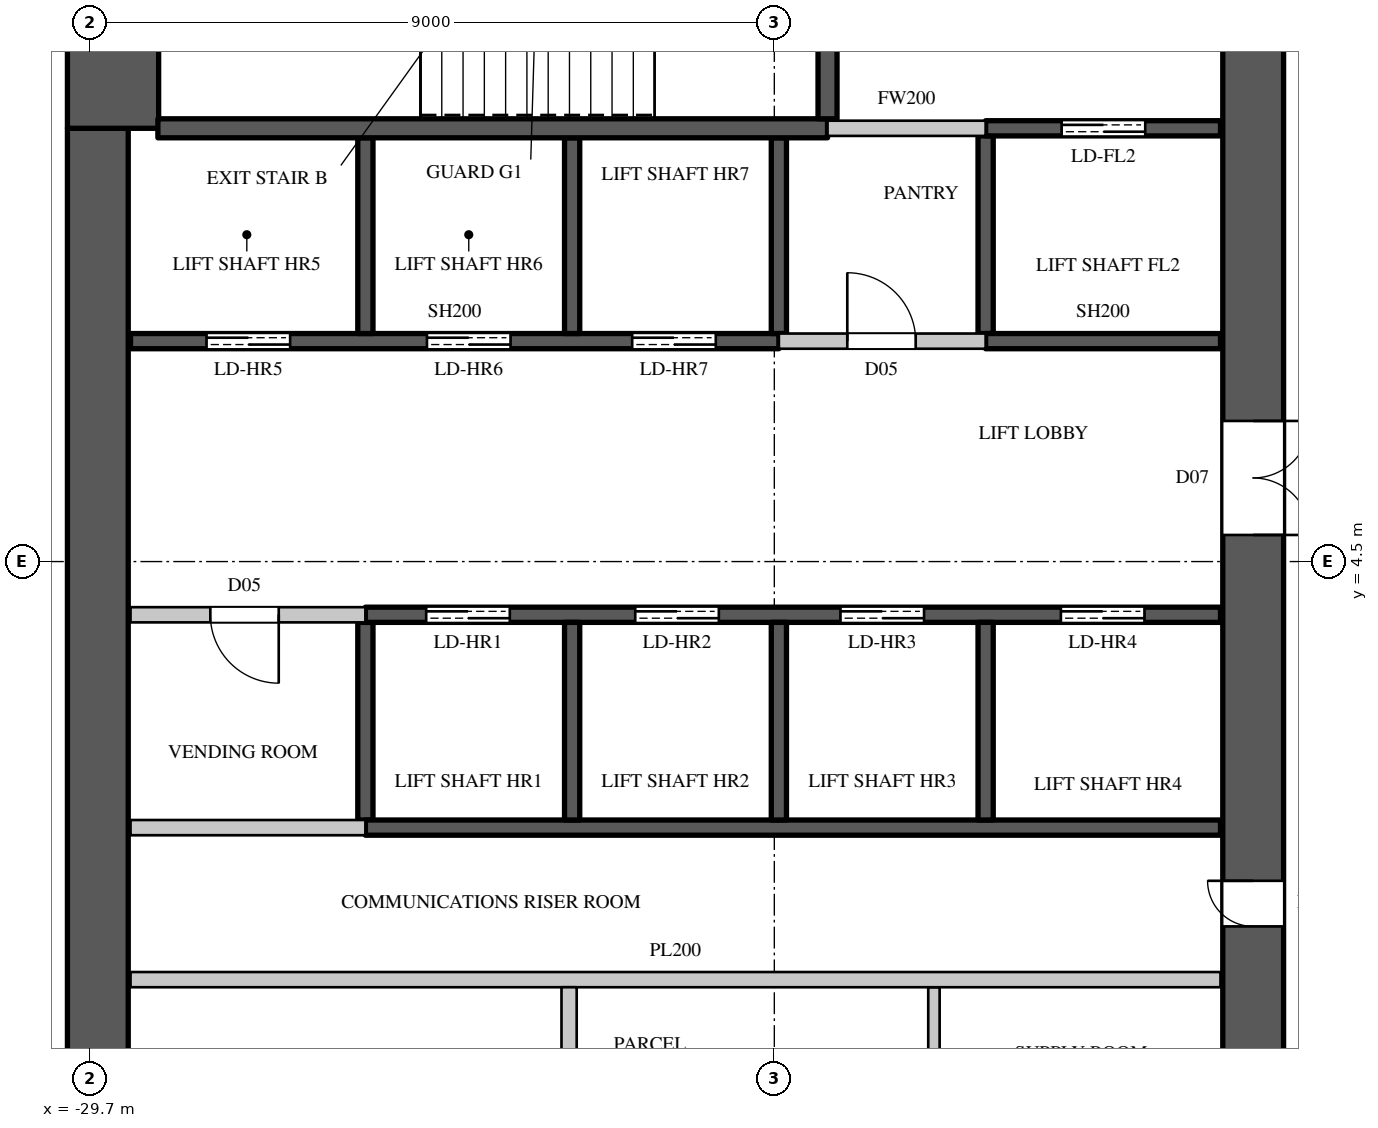
"""IFC4 building model, lengths in metres.
Left out: names, types, materials, properties, quantities, classifications, styles, units other than length and angle.
Written with IfcOpenShell. Run it as: python <this file> out.ifc"""

import sys

from ifc_helpers import new_model, si_unit, direction, frame, frame_2d, origin, place, context, subcontext, project, spatial, rectangle, extrude, element, fill, save


model = new_model("IFC4")
c1 = context("Model", 3, precision=1e-05, world=origin(), true_north=direction((0.0, 1.0)))
c2 = subcontext(c1, "Body", "Model", "MODEL_VIEW")
j1 = project(units=[si_unit("LENGTHUNIT", "METRE"), si_unit("PLANEANGLEUNIT", "RADIAN")], contexts=[c1])
p1 = place(None, origin())
s1 = spatial("IfcSite", under=j1, at=p1, CompositionType="ELEMENT")
p2 = place(p1, origin())
s2 = spatial("IfcBuilding", under=s1, at=p2, CompositionType="ELEMENT")
p3 = place(p2, frame((0.0, 0.0, 205.6)))
s3 = spatial("IfcBuildingStorey", under=s2, at=p3, CompositionType="ELEMENT", Elevation=205.6)
p4 = place(p3, frame((-14.4, -14.8, 0.0), z_axis=(0.0, 0.0, 1.0), x_axis=(0.0, 1.0, 0.0)))
e1 = element("IfcWall", 1, at=p4, inside=s3, PredefinedType="SHEAR", context=c2, shape_type="SweptSolid", body=[
    extrude(rectangle(XDim=29.6, YDim=0.8, at=frame_2d((14.8, 0.0))), origin(), (0.0, 0.0, 1.0), 4.1),
])
p5 = place(p4, frame((1.55, 0.0, 0.0)))
e2 = element("IfcOpeningElement", 2, at=p5, cuts=e1, PredefinedType="OPENING", context=c2, shape_type="SweptSolid", body=[
    extrude(rectangle(XDim=1.5, YDim=2.4, at=frame_2d((0.75, 1.2))), frame((0.0, 0.41, 0.0), z_axis=(0.0, -1.0, 0.0), x_axis=(1.0, 0.0, 0.0)), (0.0, 0.0, 1.0), 0.82),
])
p6 = place(p4, frame((26.55, 0.0, 0.0)))
e3 = element("IfcOpeningElement", 3, at=p6, cuts=e1, PredefinedType="OPENING", context=c2, shape_type="SweptSolid", body=[
    extrude(rectangle(XDim=1.5, YDim=2.4, at=frame_2d((0.75, 1.2))), frame((0.0, 0.41, 0.0), z_axis=(0.0, -1.0, 0.0), x_axis=(1.0, 0.0, 0.0)), (0.0, 0.0, 1.0), 0.82),
])
p7 = place(p4, frame((8.45, 0.0, 0.0)))
e4 = element("IfcOpeningElement", 4, at=p7, cuts=e1, PredefinedType="OPENING", context=c2, shape_type="SweptSolid", body=[
    extrude(rectangle(XDim=1.5, YDim=2.4, at=frame_2d((0.75, 1.2))), frame((0.0, 0.41, 0.0), z_axis=(0.0, -1.0, 0.0), x_axis=(1.0, 0.0, 0.0)), (0.0, 0.0, 1.0), 0.82),
])
p8 = place(p4, frame((19.65, 0.0, 0.0)))
e5 = element("IfcOpeningElement", 5, at=p8, cuts=e1, PredefinedType="OPENING", context=c2, shape_type="SweptSolid", body=[
    extrude(rectangle(XDim=1.5, YDim=2.4, at=frame_2d((0.75, 1.2))), frame((0.0, 0.41, 0.0), z_axis=(0.0, -1.0, 0.0), x_axis=(1.0, 0.0, 0.0)), (0.0, 0.0, 1.0), 0.82),
])
p9 = place(p4, frame((14.5, 0.0, 0.0)))
e6 = element("IfcOpeningElement", 6, at=p9, cuts=e1, PredefinedType="OPENING", context=c2, shape_type="SweptSolid", body=[
    extrude(rectangle(XDim=0.6, YDim=2.0, at=frame_2d((0.3, 1.0))), frame((0.0, 0.41, 0.0), z_axis=(0.0, -1.0, 0.0), x_axis=(1.0, 0.0, 0.0)), (0.0, 0.0, 1.0), 0.82),
])
p10 = place(p3, frame((-29.6, -10.2, 0.0), z_axis=(0.0, 0.0, 1.0), x_axis=(0.0, 1.0, 0.0)))
e7 = element("IfcWall", 7, at=p10, inside=s3, PredefinedType="SHEAR", context=c2, shape_type="SweptSolid", body=[
    extrude(rectangle(XDim=20.4, YDim=0.8, at=frame_2d((10.2, 0.0))), origin(), (0.0, 0.0, 1.0), 4.1),
])
p11 = place(p3, frame((-29.4, 10.2, 0.0), z_axis=(0.0, 0.0, 1.0), x_axis=(0.0, 1.0, 0.0)))
e8 = element("IfcWall", 8, at=p11, inside=s3, PredefinedType="SHEAR", context=c2, shape_type="SweptSolid", body=[
    extrude(rectangle(XDim=4.6, YDim=1.2, at=frame_2d((2.3, 0.0))), origin(), (0.0, 0.0, 1.0), 4.1),
])
p12 = place(p3, frame((-29.17, 3.8, 0.0), z_axis=(0.0, 0.0, 1.0), x_axis=(1.0, 0.0, 0.0)))
e9 = element("IfcWall", 9, at=p12, inside=s3, PredefinedType="PARTITIONING", context=c2, shape_type="SweptSolid", body=[
    extrude(rectangle(XDim=3.09, YDim=0.2, at=frame_2d((1.545, 0.0))), origin(), (0.0, 0.0, 1.0), 3.8),
])
p13 = place(p12, frame((1.05, 0.0, 0.0)))
e10 = element("IfcOpeningElement", 10, at=p13, cuts=e9, PredefinedType="OPENING", context=c2, shape_type="SweptSolid", body=[
    extrude(rectangle(XDim=0.9, YDim=2.2, at=frame_2d((0.45, 1.1))), frame((0.0, 0.11, 0.0), z_axis=(0.0, -1.0, 0.0), x_axis=(1.0, 0.0, 0.0)), (0.0, 0.0, 1.0), 0.22),
])
p14 = place(p3, frame((-20.64, 7.4, 0.0), z_axis=(0.0, 0.0, 1.0), x_axis=(1.0, 0.0, 0.0)))
e11 = element("IfcWall", 11, at=p14, inside=s3, PredefinedType="PARTITIONING", context=c2, shape_type="SweptSolid", body=[
    extrude(rectangle(XDim=2.72, YDim=0.2, at=frame_2d((1.36, 0.0))), origin(), (0.0, 0.0, 1.0), 3.8),
])
p15 = place(p14, frame((0.9, 0.0, 0.0)))
e12 = element("IfcOpeningElement", 12, at=p15, cuts=e11, PredefinedType="OPENING", context=c2, shape_type="SweptSolid", body=[
    extrude(rectangle(XDim=0.9, YDim=2.2, at=frame_2d((0.45, 1.1))), frame((0.0, 0.11, 0.0), z_axis=(0.0, -1.0, 0.0), x_axis=(1.0, 0.0, 0.0)), (0.0, 0.0, 1.0), 0.22),
])
p16 = place(p3, frame((-20.0, 10.2, 0.0), z_axis=(0.0, 0.0, 1.0), x_axis=(1.0, 0.0, 0.0)))
e13 = element("IfcWall", 13, at=p16, inside=s3, PredefinedType="PARTITIONING", context=c2, shape_type="SweptSolid", body=[
    extrude(rectangle(XDim=2.08, YDim=0.2, at=frame_2d((1.04, 0.0))), origin(), (0.0, 0.0, 1.0), 3.8),
])
p17 = place(p3, frame((-18.6, -3.7, 0.0), z_axis=(0.0, 0.0, 1.0), x_axis=(0.0, 1.0, 0.0)))
e14 = element("IfcWall", 14, at=p17, inside=s3, PredefinedType="PARTITIONING", context=c2, shape_type="SweptSolid", body=[
    extrude(rectangle(XDim=2.6, YDim=0.15, at=frame_2d((1.3, 0.0))), origin(), (0.0, 0.0, 1.0), 3.8),
])
p18 = place(p3, frame((-29.17, -1.0, 0.0), z_axis=(0.0, 0.0, 1.0), x_axis=(1.0, 0.0, 0.0)))
e15 = element("IfcWall", 15, at=p18, inside=s3, PredefinedType="PARTITIONING", context=c2, shape_type="SweptSolid", body=[
    extrude(rectangle(XDim=14.34, YDim=0.2, at=frame_2d((7.17, 0.0))), origin(), (0.0, 0.0, 1.0), 3.8),
])
p19 = place(p3, frame((-29.17, 1.0, 0.0), z_axis=(0.0, 0.0, 1.0), x_axis=(1.0, 0.0, 0.0)))
e16 = element("IfcWall", 16, at=p19, inside=s3, PredefinedType="PARTITIONING", context=c2, shape_type="SweptSolid", body=[
    extrude(rectangle(XDim=3.09, YDim=0.2, at=frame_2d((1.545, 0.0))), origin(), (0.0, 0.0, 1.0), 3.8),
])
p20 = place(p3, frame((-23.4, -3.7, 0.0), z_axis=(0.0, 0.0, 1.0), x_axis=(0.0, 1.0, 0.0)))
e17 = element("IfcWall", 17, at=p20, inside=s3, PredefinedType="PARTITIONING", context=c2, shape_type="SweptSolid", body=[
    extrude(rectangle(XDim=2.6, YDim=0.2, at=frame_2d((1.3, 0.0))), origin(), (0.0, 0.0, 1.0), 3.8),
])
p21 = place(p3, frame((-29.17, 7.4, 0.0), z_axis=(0.0, 0.0, 1.0), x_axis=(1.0, 0.0, 0.0)))
e18 = element("IfcWall", 18, at=p21, inside=s3, PredefinedType="SHEAR", context=c2, shape_type="SweptSolid", body=[
    extrude(rectangle(XDim=8.53, YDim=0.2, at=frame_2d((4.265, 0.0))), origin(), (0.0, 0.0, 1.0), 3.8),
])
p22 = place(p21, frame((1.0, 0.0, 0.0)))
e19 = element("IfcOpeningElement", 19, at=p22, cuts=e18, PredefinedType="OPENING", context=c2, shape_type="SweptSolid", body=[
    extrude(rectangle(XDim=1.1, YDim=2.2, at=frame_2d((0.55, 1.1))), frame((0.0, 0.11, 0.0), z_axis=(0.0, -1.0, 0.0), x_axis=(1.0, 0.0, 0.0)), (0.0, 0.0, 1.0), 0.22),
])
p23 = place(p21, frame((3.9, 0.0, 0.0)))
e20 = element("IfcOpeningElement", 20, at=p23, cuts=e18, PredefinedType="OPENING", context=c2, shape_type="SweptSolid", body=[
    extrude(rectangle(XDim=1.1, YDim=2.2, at=frame_2d((0.55, 1.1))), frame((0.0, 0.11, 0.0), z_axis=(0.0, -1.0, 0.0), x_axis=(1.0, 0.0, 0.0)), (0.0, 0.0, 1.0), 0.22),
])
p24 = place(p21, frame((6.6, 0.0, 0.0)))
e21 = element("IfcOpeningElement", 21, at=p24, cuts=e18, PredefinedType="OPENING", context=c2, shape_type="SweptSolid", body=[
    extrude(rectangle(XDim=1.1, YDim=2.2, at=frame_2d((0.55, 1.1))), frame((0.0, 0.11, 0.0), z_axis=(0.0, -1.0, 0.0), x_axis=(1.0, 0.0, 0.0)), (0.0, 0.0, 1.0), 0.22),
])
p25 = place(p3, frame((-26.08, 1.1, 0.0), z_axis=(0.0, 0.0, 1.0), x_axis=(0.0, 1.0, 0.0)))
e22 = element("IfcWall", 22, at=p25, inside=s3, PredefinedType="SHEAR", context=c2, shape_type="SweptSolid", body=[
    extrude(rectangle(XDim=2.6, YDim=0.2, at=frame_2d((1.3, 0.0))), origin(), (0.0, 0.0, 1.0), 3.8),
])
p26 = place(p3, frame((-26.08, 1.0, 0.0), z_axis=(0.0, 0.0, 1.0), x_axis=(1.0, 0.0, 0.0)))
e23 = element("IfcWall", 23, at=p26, inside=s3, PredefinedType="SHEAR", context=c2, shape_type="SweptSolid", body=[
    extrude(rectangle(XDim=11.25, YDim=0.2, at=frame_2d((5.625, 0.0))), origin(), (0.0, 0.0, 1.0), 3.8),
])
p27 = place(p3, frame((-26.08, 3.8, 0.0), z_axis=(0.0, 0.0, 1.0), x_axis=(1.0, 0.0, 0.0)))
e24 = element("IfcWall", 24, at=p27, inside=s3, PredefinedType="SHEAR", context=c2, shape_type="SweptSolid", body=[
    extrude(rectangle(XDim=11.25, YDim=0.2, at=frame_2d((5.625, 0.0))), origin(), (0.0, 0.0, 1.0), 3.8),
])
p28 = place(p27, frame((0.8, 0.0, 0.0)))
e25 = element("IfcOpeningElement", 25, at=p28, cuts=e24, PredefinedType="OPENING", context=c2, shape_type="SweptSolid", body=[
    extrude(rectangle(XDim=1.1, YDim=2.2, at=frame_2d((0.55, 1.1))), frame((0.0, 0.11, 0.0), z_axis=(0.0, -1.0, 0.0), x_axis=(1.0, 0.0, 0.0)), (0.0, 0.0, 1.0), 0.22),
])
p29 = place(p27, frame((3.55, 0.0, 0.0)))
e26 = element("IfcOpeningElement", 26, at=p29, cuts=e24, PredefinedType="OPENING", context=c2, shape_type="SweptSolid", body=[
    extrude(rectangle(XDim=1.1, YDim=2.2, at=frame_2d((0.55, 1.1))), frame((0.0, 0.11, 0.0), z_axis=(0.0, -1.0, 0.0), x_axis=(1.0, 0.0, 0.0)), (0.0, 0.0, 1.0), 0.22),
])
p30 = place(p27, frame((6.25, 0.0, 0.0)))
e27 = element("IfcOpeningElement", 27, at=p30, cuts=e24, PredefinedType="OPENING", context=c2, shape_type="SweptSolid", body=[
    extrude(rectangle(XDim=1.1, YDim=2.2, at=frame_2d((0.55, 1.1))), frame((0.0, 0.11, 0.0), z_axis=(0.0, -1.0, 0.0), x_axis=(1.0, 0.0, 0.0)), (0.0, 0.0, 1.0), 0.22),
])
p31 = place(p27, frame((9.15, 0.0, 0.0)))
e28 = element("IfcOpeningElement", 28, at=p31, cuts=e24, PredefinedType="OPENING", context=c2, shape_type="SweptSolid", body=[
    extrude(rectangle(XDim=1.1, YDim=2.2, at=frame_2d((0.55, 1.1))), frame((0.0, 0.11, 0.0), z_axis=(0.0, -1.0, 0.0), x_axis=(1.0, 0.0, 0.0)), (0.0, 0.0, 1.0), 0.22),
])
p32 = place(p3, frame((-26.08, 7.5, 0.0), z_axis=(0.0, 0.0, 1.0), x_axis=(0.0, 1.0, 0.0)))
e29 = element("IfcWall", 29, at=p32, inside=s3, PredefinedType="SHEAR", context=c2, shape_type="SweptSolid", body=[
    extrude(rectangle(XDim=2.575, YDim=0.2, at=frame_2d((1.288, 0.0))), origin(), (0.0, 0.0, 1.0), 4.1),
])
p33 = place(p3, frame((-23.36, 1.1, 0.0), z_axis=(0.0, 0.0, 1.0), x_axis=(0.0, 1.0, 0.0)))
e30 = element("IfcWall", 30, at=p33, inside=s3, PredefinedType="SHEAR", context=c2, shape_type="SweptSolid", body=[
    extrude(rectangle(XDim=2.6, YDim=0.2, at=frame_2d((1.3, 0.0))), origin(), (0.0, 0.0, 1.0), 4.1),
])
p34 = place(p3, frame((-23.36, 7.5, 0.0), z_axis=(0.0, 0.0, 1.0), x_axis=(0.0, 1.0, 0.0)))
e31 = element("IfcWall", 31, at=p34, inside=s3, PredefinedType="SHEAR", context=c2, shape_type="SweptSolid", body=[
    extrude(rectangle(XDim=2.575, YDim=0.2, at=frame_2d((1.288, 0.0))), origin(), (0.0, 0.0, 1.0), 4.1),
])
p35 = place(p3, frame((-20.64, 1.1, 0.0), z_axis=(0.0, 0.0, 1.0), x_axis=(0.0, 1.0, 0.0)))
e32 = element("IfcWall", 32, at=p35, inside=s3, PredefinedType="SHEAR", context=c2, shape_type="SweptSolid", body=[
    extrude(rectangle(XDim=2.6, YDim=0.2, at=frame_2d((1.3, 0.0))), origin(), (0.0, 0.0, 1.0), 4.1),
])
p36 = place(p3, frame((-20.64, 7.5, 0.0), z_axis=(0.0, 0.0, 1.0), x_axis=(0.0, 1.0, 0.0)))
e33 = element("IfcWall", 33, at=p36, inside=s3, PredefinedType="SHEAR", context=c2, shape_type="SweptSolid", body=[
    extrude(rectangle(XDim=2.575, YDim=0.2, at=frame_2d((1.288, 0.0))), origin(), (0.0, 0.0, 1.0), 3.8),
])
p37 = place(p3, frame((-17.92, 1.1, 0.0), z_axis=(0.0, 0.0, 1.0), x_axis=(0.0, 1.0, 0.0)))
e34 = element("IfcWall", 34, at=p37, inside=s3, PredefinedType="SHEAR", context=c2, shape_type="SweptSolid", body=[
    extrude(rectangle(XDim=2.6, YDim=0.2, at=frame_2d((1.3, 0.0))), origin(), (0.0, 0.0, 1.0), 4.1),
])
p38 = place(p3, frame((-17.92, 7.5, 0.0), z_axis=(0.0, 0.0, 1.0), x_axis=(0.0, 1.0, 0.0)))
e35 = element("IfcWall", 35, at=p38, inside=s3, PredefinedType="SHEAR", context=c2, shape_type="SweptSolid", body=[
    extrude(rectangle(XDim=2.6, YDim=0.2, at=frame_2d((1.3, 0.0))), origin(), (0.0, 0.0, 1.0), 3.8),
])
p39 = place(p3, frame((-17.92, 7.4, 0.0), z_axis=(0.0, 0.0, 1.0), x_axis=(1.0, 0.0, 0.0)))
e36 = element("IfcWall", 36, at=p39, inside=s3, PredefinedType="SHEAR", context=c2, shape_type="SweptSolid", body=[
    extrude(rectangle(XDim=3.09, YDim=0.2, at=frame_2d((1.545, 0.0))), origin(), (0.0, 0.0, 1.0), 3.8),
])
p40 = place(p3, frame((-17.92, 10.2, 0.0), z_axis=(0.0, 0.0, 1.0), x_axis=(1.0, 0.0, 0.0)))
e37 = element("IfcWall", 37, at=p40, inside=s3, PredefinedType="SHEAR", context=c2, shape_type="SweptSolid", body=[
    extrude(rectangle(XDim=3.09, YDim=0.2, at=frame_2d((1.545, 0.0))), origin(), (0.0, 0.0, 1.0), 3.8),
])
p41 = place(p40, frame((1.0, 0.0, 0.0)))
e38 = element("IfcOpeningElement", 38, at=p41, cuts=e37, PredefinedType="OPENING", context=c2, shape_type="SweptSolid", body=[
    extrude(rectangle(XDim=1.1, YDim=2.2, at=frame_2d((0.55, 1.1))), frame((0.0, 0.11, 0.0), z_axis=(0.0, -1.0, 0.0), x_axis=(1.0, 0.0, 0.0)), (0.0, 0.0, 1.0), 0.22),
])
p42 = place(p3, frame((-28.81, 10.2, 0.0), z_axis=(0.0, 0.0, 1.0), x_axis=(1.0, 0.0, 0.0)))
e39 = element("IfcWall", 39, at=p42, inside=s3, PredefinedType="SHEAR", context=c2, shape_type="SweptSolid", body=[
    extrude(rectangle(XDim=8.81, YDim=0.25, at=frame_2d((4.405, 0.0))), origin(), (0.0, 0.0, 1.0), 3.8),
])
p43 = place(p3, frame((-20.0, 10.325, 0.0), z_axis=(0.0, 0.0, 1.0), x_axis=(0.0, 1.0, 0.0)))
e40 = element("IfcWall", 40, at=p43, inside=s3, PredefinedType="SHEAR", context=c2, shape_type="SweptSolid", body=[
    extrude(rectangle(XDim=4.445, YDim=0.25, at=frame_2d((2.223, 0.0))), origin(), (0.0, 0.0, 1.0), 3.8),
])
p44 = place(p43, frame((1.65, 0.0, 0.0)))
e41 = element("IfcOpeningElement", 41, at=p44, cuts=e40, PredefinedType="OPENING", context=c2, shape_type="SweptSolid", body=[
    extrude(rectangle(XDim=1.1, YDim=2.2, at=frame_2d((0.55, 1.1))), frame((0.0, 0.135, 0.0), z_axis=(0.0, -1.0, 0.0), x_axis=(1.0, 0.0, 0.0)), (0.0, 0.0, 1.0), 0.27),
])
p45 = place(p13, origin())
e42 = element("IfcDoor", 42, at=p45, inside=s3, OperationType="SINGLE_SWING_LEFT", PredefinedType="DOOR", context=c2, shape_type="SweptSolid", body=[
    extrude(rectangle(XDim=0.9, YDim=2.2, at=frame_2d((0.45, 1.1))), frame((0.0, 0.025, 0.0), z_axis=(0.0, -1.0, 0.0), x_axis=(1.0, 0.0, 0.0)), (0.0, 0.0, 1.0), 0.05),
])
fill(e10, e42)
p46 = place(p15, origin())
e43 = element("IfcDoor", 43, at=p46, inside=s3, OperationType="SINGLE_SWING_LEFT", PredefinedType="DOOR", context=c2, shape_type="SweptSolid", body=[
    extrude(rectangle(XDim=0.9, YDim=2.2, at=frame_2d((0.45, 1.1))), frame((0.0, 0.025, 0.0), z_axis=(0.0, -1.0, 0.0), x_axis=(1.0, 0.0, 0.0)), (0.0, 0.0, 1.0), 0.05),
])
fill(e12, e43)
p47 = place(p28, origin())
e44 = element("IfcDoor", 44, at=p47, inside=s3, OperationType="DOUBLE_DOOR_SLIDING", PredefinedType="DOOR", context=c2, shape_type="SweptSolid", body=[
    extrude(rectangle(XDim=1.1, YDim=2.2, at=frame_2d((0.55, 1.1))), frame((0.0, 0.025, 0.0), z_axis=(0.0, -1.0, 0.0), x_axis=(1.0, 0.0, 0.0)), (0.0, 0.0, 1.0), 0.05),
])
fill(e25, e44)
p48 = place(p29, origin())
e45 = element("IfcDoor", 45, at=p48, inside=s3, OperationType="DOUBLE_DOOR_SLIDING", PredefinedType="DOOR", context=c2, shape_type="SweptSolid", body=[
    extrude(rectangle(XDim=1.1, YDim=2.2, at=frame_2d((0.55, 1.1))), frame((0.0, 0.025, 0.0), z_axis=(0.0, -1.0, 0.0), x_axis=(1.0, 0.0, 0.0)), (0.0, 0.0, 1.0), 0.05),
])
fill(e26, e45)
p49 = place(p30, origin())
e46 = element("IfcDoor", 46, at=p49, inside=s3, OperationType="DOUBLE_DOOR_SLIDING", PredefinedType="DOOR", context=c2, shape_type="SweptSolid", body=[
    extrude(rectangle(XDim=1.1, YDim=2.2, at=frame_2d((0.55, 1.1))), frame((0.0, 0.025, 0.0), z_axis=(0.0, -1.0, 0.0), x_axis=(1.0, 0.0, 0.0)), (0.0, 0.0, 1.0), 0.05),
])
fill(e27, e46)
p50 = place(p31, origin())
e47 = element("IfcDoor", 47, at=p50, inside=s3, OperationType="DOUBLE_DOOR_SLIDING", PredefinedType="DOOR", context=c2, shape_type="SweptSolid", body=[
    extrude(rectangle(XDim=1.1, YDim=2.2, at=frame_2d((0.55, 1.1))), frame((0.0, 0.025, 0.0), z_axis=(0.0, -1.0, 0.0), x_axis=(1.0, 0.0, 0.0)), (0.0, 0.0, 1.0), 0.05),
])
fill(e28, e47)
p51 = place(p22, origin())
e48 = element("IfcDoor", 48, at=p51, inside=s3, OperationType="DOUBLE_DOOR_SLIDING", PredefinedType="DOOR", context=c2, shape_type="SweptSolid", body=[
    extrude(rectangle(XDim=1.1, YDim=2.2, at=frame_2d((0.55, 1.1))), frame((0.0, 0.025, 0.0), z_axis=(0.0, -1.0, 0.0), x_axis=(1.0, 0.0, 0.0)), (0.0, 0.0, 1.0), 0.05),
])
fill(e19, e48)
p52 = place(p23, origin())
e49 = element("IfcDoor", 49, at=p52, inside=s3, OperationType="DOUBLE_DOOR_SLIDING", PredefinedType="DOOR", context=c2, shape_type="SweptSolid", body=[
    extrude(rectangle(XDim=1.1, YDim=2.2, at=frame_2d((0.55, 1.1))), frame((0.0, 0.025, 0.0), z_axis=(0.0, -1.0, 0.0), x_axis=(1.0, 0.0, 0.0)), (0.0, 0.0, 1.0), 0.05),
])
fill(e20, e49)
p53 = place(p24, origin())
e50 = element("IfcDoor", 50, at=p53, inside=s3, OperationType="DOUBLE_DOOR_SLIDING", PredefinedType="DOOR", context=c2, shape_type="SweptSolid", body=[
    extrude(rectangle(XDim=1.1, YDim=2.2, at=frame_2d((0.55, 1.1))), frame((0.0, 0.025, 0.0), z_axis=(0.0, -1.0, 0.0), x_axis=(1.0, 0.0, 0.0)), (0.0, 0.0, 1.0), 0.05),
])
fill(e21, e50)
p54 = place(p41, origin())
e51 = element("IfcDoor", 51, at=p54, inside=s3, OperationType="DOUBLE_DOOR_SLIDING", PredefinedType="DOOR", context=c2, shape_type="SweptSolid", body=[
    extrude(rectangle(XDim=1.1, YDim=2.2, at=frame_2d((0.55, 1.1))), frame((0.0, 0.025, 0.0), z_axis=(0.0, -1.0, 0.0), x_axis=(1.0, 0.0, 0.0)), (0.0, 0.0, 1.0), 0.05),
])
fill(e38, e51)
p55 = place(p8, origin())
e52 = element("IfcDoor", 52, at=p55, inside=s3, OperationType="DOUBLE_DOOR_SINGLE_SWING", PredefinedType="DOOR", context=c2, shape_type="SweptSolid", body=[
    extrude(rectangle(XDim=1.5, YDim=2.4, at=frame_2d((0.75, 1.2))), frame((0.0, -0.345, 0.0), z_axis=(0.0, -1.0, 0.0), x_axis=(1.0, 0.0, 0.0)), (0.0, 0.0, 1.0), 0.05),
])
fill(e5, e52)
p56 = place(p9, origin())
e53 = element("IfcDoor", 53, at=p56, inside=s3, OperationType="SINGLE_SWING_RIGHT", PredefinedType="DOOR", context=c2, shape_type="SweptSolid", body=[
    extrude(rectangle(XDim=0.6, YDim=2.0, at=frame_2d((0.3, 1.0))), frame((0.0, 0.395, 0.0), z_axis=(0.0, -1.0, 0.0), x_axis=(1.0, 0.0, 0.0)), (0.0, 0.0, 1.0), 0.05),
])
fill(e6, e53)
save(model, sys.argv[1])
